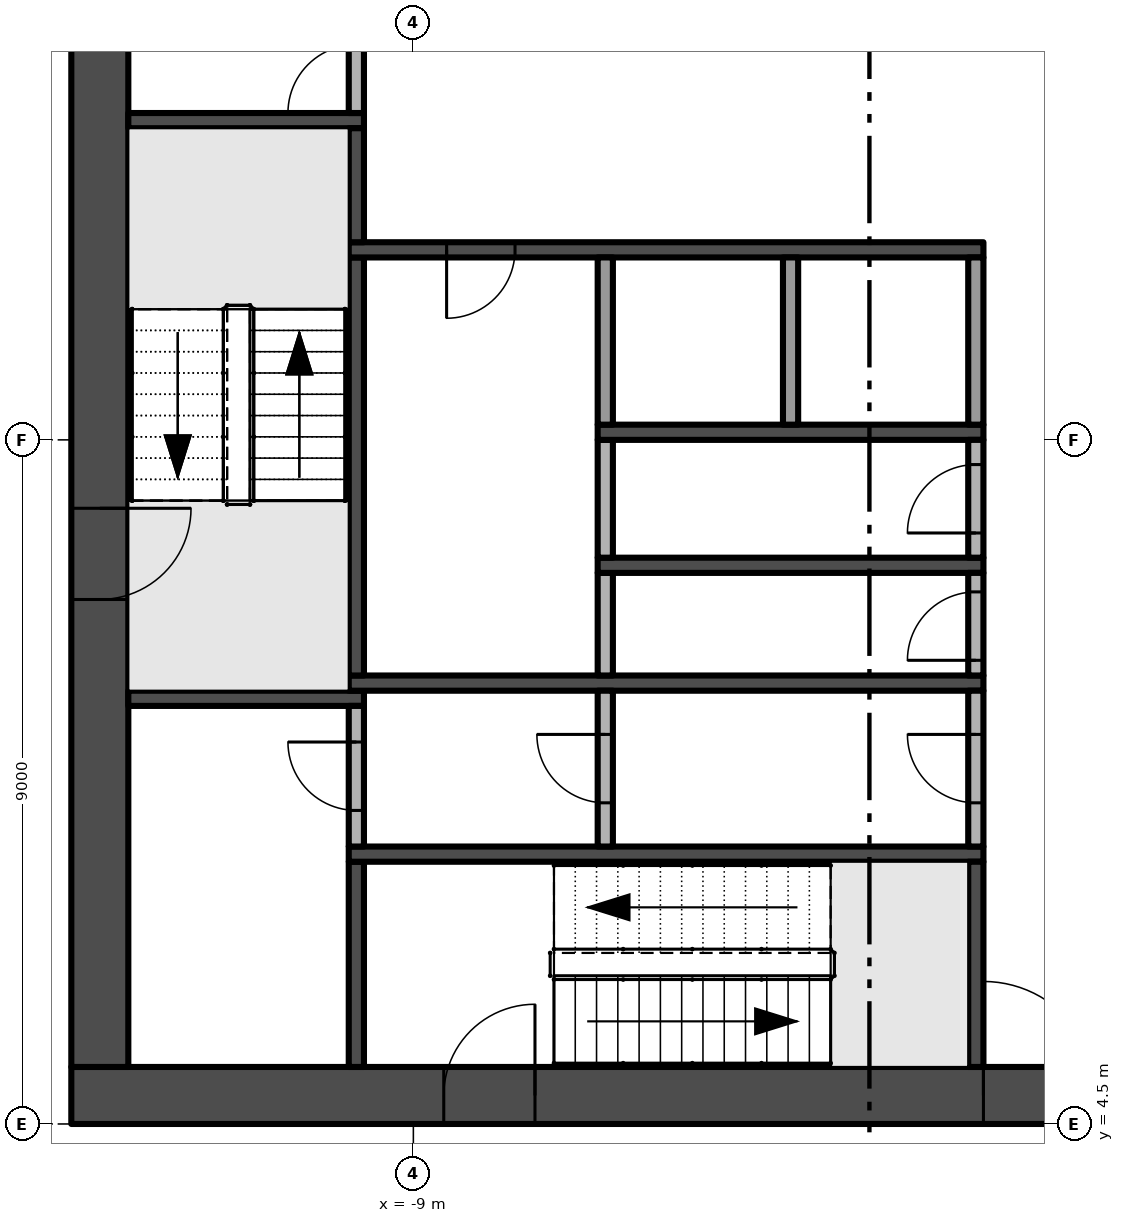
"""IFC4 building model, lengths in metres.
Left out: names, types, materials, properties, quantities, classifications, styles, units other than length and angle.
Written with IfcOpenShell. Run it as: python <this file> out.ifc"""

import sys

from ifc_helpers import new_model, si_unit, direction, frame, frame_2d, origin, place, context, subcontext, project, spatial, rectangle, extrude, element, fill, save


model = new_model("IFC4")
c1 = context("Model", 3, precision=1e-05, world=origin(), true_north=direction((0.0, 1.0)))
c2 = subcontext(c1, "Body", "Model", "MODEL_VIEW")
j1 = project(units=[si_unit("LENGTHUNIT", "METRE"), si_unit("PLANEANGLEUNIT", "RADIAN")], contexts=[c1])
p1 = place(None, origin())
s1 = spatial("IfcSite", under=j1, at=p1, CompositionType="ELEMENT")
p2 = place(p1, origin())
s2 = spatial("IfcBuilding", under=s1, at=p2, CompositionType="ELEMENT")
p3 = place(p2, frame((0.0, 0.0, 174.4)))
s3 = spatial("IfcBuildingStorey", under=s2, at=p3, CompositionType="ELEMENT", Elevation=174.4)
p4 = place(p3, frame((-13.5, 4.875, -0.3), z_axis=(0.0, 0.0, 1.0), x_axis=(1.0, 0.0, 0.0)))
e1 = element("IfcWall", 1, at=p4, inside=s3, PredefinedType="SHEAR", context=c2, shape_type="SweptSolid", body=[
    extrude(rectangle(XDim=27.0, YDim=0.75, at=frame_2d((13.5, 0.0))), origin(), (0.0, 0.0, 1.0), 5.0),
])
p5 = place(p4, frame((12.0, 0.0, 0.3)))
e2 = element("IfcOpeningElement", 2, at=p5, cuts=e1, PredefinedType="OPENING", context=c2, shape_type="SweptSolid", body=[
    extrude(rectangle(XDim=3.0, YDim=2.4, at=frame_2d((1.5, 1.2))), frame((0.0, 0.385, 0.0), z_axis=(0.0, -1.0, 0.0), x_axis=(1.0, 0.0, 0.0)), (0.0, 0.0, 1.0), 0.77),
])
p6 = place(p4, frame((4.9, 0.0, 0.3)))
e3 = element("IfcOpeningElement", 3, at=p6, cuts=e1, PredefinedType="OPENING", context=c2, shape_type="SweptSolid", body=[
    extrude(rectangle(XDim=1.2, YDim=2.2, at=frame_2d((0.6, 1.1))), frame((0.0, 0.385, 0.0), z_axis=(0.0, -1.0, 0.0), x_axis=(1.0, 0.0, 0.0)), (0.0, 0.0, 1.0), 0.77),
])
p7 = place(p4, frame((20.75, 0.0, 0.3)))
e4 = element("IfcOpeningElement", 4, at=p7, cuts=e1, PredefinedType="OPENING", context=c2, shape_type="SweptSolid", body=[
    extrude(rectangle(XDim=1.5, YDim=2.2, at=frame_2d((0.75, 1.1))), frame((0.0, 0.385, 0.0), z_axis=(0.0, -1.0, 0.0), x_axis=(1.0, 0.0, 0.0)), (0.0, 0.0, 1.0), 0.77),
])
p8 = place(p4, frame((17.4, 0.0, 0.3)))
e5 = element("IfcOpeningElement", 5, at=p8, cuts=e1, PredefinedType="OPENING", context=c2, shape_type="SweptSolid", body=[
    extrude(rectangle(XDim=1.2, YDim=2.2, at=frame_2d((0.6, 1.1))), frame((0.0, 0.385, 0.0), z_axis=(0.0, -1.0, 0.0), x_axis=(1.0, 0.0, 0.0)), (0.0, 0.0, 1.0), 0.77),
])
p9 = place(p3, frame((-13.125, 21.75, -0.3), z_axis=(0.0, 0.0, 1.0), x_axis=(0.0, -1.0, 0.0)))
e6 = element("IfcWall", 6, at=p9, inside=s3, PredefinedType="SHEAR", context=c2, shape_type="SweptSolid", body=[
    extrude(rectangle(XDim=16.5, YDim=0.75, at=frame_2d((8.25, 0.0))), origin(), (0.0, 0.0, 1.0), 5.0),
])
p10 = place(p9, frame((9.15, 0.0, 0.3)))
e7 = element("IfcOpeningElement", 7, at=p10, cuts=e6, PredefinedType="OPENING", context=c2, shape_type="SweptSolid", body=[
    extrude(rectangle(XDim=1.2, YDim=2.2, at=frame_2d((0.6, 1.1))), frame((0.0, 0.385, 0.0), z_axis=(0.0, -1.0, 0.0), x_axis=(1.0, 0.0, 0.0)), (0.0, 0.0, 1.0), 0.77),
])
for number, where, z_axis, x_axis in (
    (8, (-12.75, 10.1, 0.0), (0.0, 0.0, 1.0), (1.0, 0.0, 0.0)),
    (9, (-12.75, 17.7, 0.0), (0.0, 0.0, 1.0), (1.0, 0.0, 0.0)),
):
    element("IfcWall", number, at=place(p3, frame(where, z_axis=z_axis, x_axis=x_axis)), inside=s3, PredefinedType="SHEAR", context=c2, shape_type="SweptSolid", body=[
        extrude(rectangle(XDim=3.1, YDim=0.2, at=frame_2d((1.55, 0.0))), origin(), (0.0, 0.0, 1.0), 4.7),
    ])
p11 = place(p3, frame((-9.75, 5.25, 0.0), z_axis=(0.0, 0.0, 1.0), x_axis=(0.0, 1.0, 0.0)))
e10 = element("IfcWall", 10, at=p11, inside=s3, PredefinedType="SHEAR", context=c2, shape_type="SweptSolid", body=[
    extrude(rectangle(XDim=2.7, YDim=0.2, at=frame_2d((1.35, 0.0))), origin(), (0.0, 0.0, 1.0), 4.7),
])
p12 = place(p3, frame((-9.85, 8.05, 0.0), z_axis=(0.0, 0.0, 1.0), x_axis=(1.0, 0.0, 0.0)))
e11 = element("IfcWall", 11, at=p12, inside=s3, PredefinedType="SHEAR", context=c2, shape_type="SweptSolid", body=[
    extrude(rectangle(XDim=8.35, YDim=0.2, at=frame_2d((4.175, 0.0))), origin(), (0.0, 0.0, 1.0), 4.7),
])
p13 = place(p3, frame((-9.75, 8.15, 0.0), z_axis=(0.0, 0.0, 1.0), x_axis=(0.0, 1.0, 0.0)))
e12 = element("IfcWall", 12, at=p13, inside=s3, PredefinedType="PARTITIONING", context=c2, shape_type="SweptSolid", body=[
    extrude(rectangle(XDim=1.85, YDim=0.2, at=frame_2d((0.925, 0.0))), origin(), (0.0, 0.0, 1.0), 4.7),
])
p14 = place(p13, frame((0.475, 0.0, 0.0)))
e13 = element("IfcOpeningElement", 13, at=p14, cuts=e12, PredefinedType="OPENING", context=c2, shape_type="SweptSolid", body=[
    extrude(rectangle(XDim=0.9, YDim=2.1, at=frame_2d((0.45, 1.05))), frame((0.0, 0.11, 0.0), z_axis=(0.0, -1.0, 0.0), x_axis=(1.0, 0.0, 0.0)), (0.0, 0.0, 1.0), 0.22),
])
p15 = place(p3, frame((-9.85, 10.3, 0.0), z_axis=(0.0, 0.0, 1.0), x_axis=(1.0, 0.0, 0.0)))
e14 = element("IfcWall", 14, at=p15, inside=s3, PredefinedType="SHEAR", context=c2, shape_type="SweptSolid", body=[
    extrude(rectangle(XDim=8.35, YDim=0.2, at=frame_2d((4.175, 0.0))), origin(), (0.0, 0.0, 1.0), 4.7),
])
p16 = place(p3, frame((-9.75, 10.4, 0.0), z_axis=(0.0, 0.0, 1.0), x_axis=(0.0, 1.0, 0.0)))
e15 = element("IfcWall", 15, at=p16, inside=s3, PredefinedType="SHEAR", context=c2, shape_type="SweptSolid", body=[
    extrude(rectangle(XDim=5.5, YDim=0.2, at=frame_2d((2.75, 0.0))), origin(), (0.0, 0.0, 1.0), 4.7),
])
p17 = place(p3, frame((-1.5, 16.0, 0.0), z_axis=(0.0, 0.0, 1.0), x_axis=(-1.0, 0.0, 0.0)))
e16 = element("IfcWall", 16, at=p17, inside=s3, PredefinedType="SHEAR", context=c2, shape_type="SweptSolid", body=[
    extrude(rectangle(XDim=8.35, YDim=0.2, at=frame_2d((4.175, 0.0))), origin(), (0.0, 0.0, 1.0), 4.7),
])
p18 = place(p17, frame((6.162, 0.0, 0.0)))
e17 = element("IfcOpeningElement", 17, at=p18, cuts=e16, PredefinedType="OPENING", context=c2, shape_type="SweptSolid", body=[
    extrude(rectangle(XDim=0.9, YDim=2.1, at=frame_2d((0.45, 1.05))), frame((0.0, 0.11, 0.0), z_axis=(0.0, -1.0, 0.0), x_axis=(1.0, 0.0, 0.0)), (0.0, 0.0, 1.0), 0.22),
])
p19 = place(p3, frame((-9.75, 16.1, 0.0), z_axis=(0.0, 0.0, 1.0), x_axis=(0.0, 1.0, 0.0)))
e18 = element("IfcWall", 18, at=p19, inside=s3, PredefinedType="SHEAR", context=c2, shape_type="SweptSolid", body=[
    extrude(rectangle(XDim=1.5, YDim=0.2, at=frame_2d((0.75, 0.0))), origin(), (0.0, 0.0, 1.0), 4.7),
])
p20 = place(p3, frame((-9.75, 17.8, 0.0), z_axis=(0.0, 0.0, 1.0), x_axis=(0.0, 1.0, 0.0)))
e19 = element("IfcWall", 19, at=p20, inside=s3, PredefinedType="PARTITIONING", context=c2, shape_type="SweptSolid", body=[
    extrude(rectangle(XDim=1.4, YDim=0.2, at=frame_2d((0.7, 0.0))), origin(), (0.0, 0.0, 1.0), 4.7),
])
p21 = place(p20, origin())
e20 = element("IfcOpeningElement", 20, at=p21, cuts=e19, PredefinedType="OPENING", context=c2, shape_type="SweptSolid", body=[
    extrude(rectangle(XDim=0.9, YDim=2.1, at=frame_2d((0.45, 1.05))), frame((0.0, 0.11, 0.0), z_axis=(0.0, -1.0, 0.0), x_axis=(1.0, 0.0, 0.0)), (0.0, 0.0, 1.0), 0.22),
])
p22 = place(p3, frame((-6.475, 8.15, 0.0), z_axis=(0.0, 0.0, 1.0), x_axis=(0.0, 1.0, 0.0)))
e21 = element("IfcWall", 21, at=p22, inside=s3, PredefinedType="PARTITIONING", context=c2, shape_type="SweptSolid", body=[
    extrude(rectangle(XDim=2.05, YDim=0.2, at=frame_2d((1.025, 0.0))), origin(), (0.0, 0.0, 1.0), 4.7),
])
p23 = place(p22, frame((0.575, 0.0, 0.0)))
e22 = element("IfcOpeningElement", 22, at=p23, cuts=e21, PredefinedType="OPENING", context=c2, shape_type="SweptSolid", body=[
    extrude(rectangle(XDim=0.9, YDim=2.1, at=frame_2d((0.45, 1.05))), frame((0.0, 0.11, 0.0), z_axis=(0.0, -1.0, 0.0), x_axis=(1.0, 0.0, 0.0)), (0.0, 0.0, 1.0), 0.22),
])
p24 = place(p3, frame((-6.475, 10.4, 0.0), z_axis=(0.0, 0.0, 1.0), x_axis=(0.0, 1.0, 0.0)))
e23 = element("IfcWall", 23, at=p24, inside=s3, PredefinedType="PARTITIONING", context=c2, shape_type="SweptSolid", body=[
    extrude(rectangle(XDim=1.35, YDim=0.2, at=frame_2d((0.675, 0.0))), origin(), (0.0, 0.0, 1.0), 4.7),
])
p25 = place(p3, frame((-6.575, 11.85, 0.0), z_axis=(0.0, 0.0, 1.0), x_axis=(1.0, 0.0, 0.0)))
e24 = element("IfcWall", 24, at=p25, inside=s3, PredefinedType="SHEAR", context=c2, shape_type="SweptSolid", body=[
    extrude(rectangle(XDim=5.075, YDim=0.2, at=frame_2d((2.538, 0.0))), origin(), (0.0, 0.0, 1.0), 4.7),
])
p26 = place(p3, frame((-6.475, 11.95, 0.0), z_axis=(0.0, 0.0, 1.0), x_axis=(0.0, 1.0, 0.0)))
e25 = element("IfcWall", 25, at=p26, inside=s3, PredefinedType="PARTITIONING", context=c2, shape_type="SweptSolid", body=[
    extrude(rectangle(XDim=1.55, YDim=0.2, at=frame_2d((0.775, 0.0))), origin(), (0.0, 0.0, 1.0), 4.7),
])
p27 = place(p3, frame((-6.575, 13.6, 0.0), z_axis=(0.0, 0.0, 1.0), x_axis=(1.0, 0.0, 0.0)))
e26 = element("IfcWall", 26, at=p27, inside=s3, PredefinedType="SHEAR", context=c2, shape_type="SweptSolid", body=[
    extrude(rectangle(XDim=5.075, YDim=0.2, at=frame_2d((2.538, 0.0))), origin(), (0.0, 0.0, 1.0), 4.7),
])
for number, where, z_axis, x_axis in (
    (27, (-6.475, 13.7, 0.0), (0.0, 0.0, 1.0), (0.0, 1.0, 0.0)),
    (28, (-4.037, 13.7, 0.0), (0.0, 0.0, 1.0), (0.0, 1.0, 0.0)),
):
    element("IfcWall", number, at=place(p3, frame(where, z_axis=z_axis, x_axis=x_axis)), inside=s3, PredefinedType="PARTITIONING", context=c2, shape_type="SweptSolid", body=[
        extrude(rectangle(XDim=2.2, YDim=0.2, at=frame_2d((1.1, 0.0))), origin(), (0.0, 0.0, 1.0), 4.7),
    ])
p28 = place(p3, frame((-1.6, 5.25, 0.0), z_axis=(0.0, 0.0, 1.0), x_axis=(0.0, 1.0, 0.0)))
e29 = element("IfcWall", 29, at=p28, inside=s3, PredefinedType="SHEAR", context=c2, shape_type="SweptSolid", body=[
    extrude(rectangle(XDim=2.7, YDim=0.2, at=frame_2d((1.35, 0.0))), origin(), (0.0, 0.0, 1.0), 4.7),
])
p29 = place(p3, frame((-1.6, 8.15, 0.0), z_axis=(0.0, 0.0, 1.0), x_axis=(0.0, 1.0, 0.0)))
e30 = element("IfcWall", 30, at=p29, inside=s3, PredefinedType="PARTITIONING", context=c2, shape_type="SweptSolid", body=[
    extrude(rectangle(XDim=2.05, YDim=0.2, at=frame_2d((1.025, 0.0))), origin(), (0.0, 0.0, 1.0), 4.7),
])
p30 = place(p29, frame((0.575, 0.0, 0.0)))
e31 = element("IfcOpeningElement", 31, at=p30, cuts=e30, PredefinedType="OPENING", context=c2, shape_type="SweptSolid", body=[
    extrude(rectangle(XDim=0.9, YDim=2.1, at=frame_2d((0.45, 1.05))), frame((0.0, 0.11, 0.0), z_axis=(0.0, -1.0, 0.0), x_axis=(1.0, 0.0, 0.0)), (0.0, 0.0, 1.0), 0.22),
])
p31 = place(p3, frame((-1.6, 10.4, 0.0), z_axis=(0.0, 0.0, 1.0), x_axis=(0.0, 1.0, 0.0)))
e32 = element("IfcWall", 32, at=p31, inside=s3, PredefinedType="PARTITIONING", context=c2, shape_type="SweptSolid", body=[
    extrude(rectangle(XDim=1.35, YDim=0.2, at=frame_2d((0.675, 0.0))), origin(), (0.0, 0.0, 1.0), 4.7),
])
p32 = place(p31, frame((0.2, 0.0, 0.0)))
e33 = element("IfcOpeningElement", 33, at=p32, cuts=e32, PredefinedType="OPENING", context=c2, shape_type="SweptSolid", body=[
    extrude(rectangle(XDim=0.9, YDim=2.1, at=frame_2d((0.45, 1.05))), frame((0.0, 0.11, 0.0), z_axis=(0.0, -1.0, 0.0), x_axis=(1.0, 0.0, 0.0)), (0.0, 0.0, 1.0), 0.22),
])
p33 = place(p3, frame((-1.6, 11.95, 0.0), z_axis=(0.0, 0.0, 1.0), x_axis=(0.0, 1.0, 0.0)))
e34 = element("IfcWall", 34, at=p33, inside=s3, PredefinedType="PARTITIONING", context=c2, shape_type="SweptSolid", body=[
    extrude(rectangle(XDim=1.55, YDim=0.2, at=frame_2d((0.775, 0.0))), origin(), (0.0, 0.0, 1.0), 4.7),
])
p34 = place(p33, frame((0.325, 0.0, 0.0)))
e35 = element("IfcOpeningElement", 35, at=p34, cuts=e34, PredefinedType="OPENING", context=c2, shape_type="SweptSolid", body=[
    extrude(rectangle(XDim=0.9, YDim=2.1, at=frame_2d((0.45, 1.05))), frame((0.0, 0.11, 0.0), z_axis=(0.0, -1.0, 0.0), x_axis=(1.0, 0.0, 0.0)), (0.0, 0.0, 1.0), 0.22),
])
p35 = place(p3, frame((-1.6, 13.7, 0.0), z_axis=(0.0, 0.0, 1.0), x_axis=(0.0, 1.0, 0.0)))
e36 = element("IfcWall", 36, at=p35, inside=s3, PredefinedType="PARTITIONING", context=c2, shape_type="SweptSolid", body=[
    extrude(rectangle(XDim=2.2, YDim=0.2, at=frame_2d((1.1, 0.0))), origin(), (0.0, 0.0, 1.0), 4.7),
])
p36 = place(p5, frame((3.0, 0.0, 0.0), z_axis=(0.0, 0.0, 1.0), x_axis=(-1.0, 0.0, 0.0)))
e37 = element("IfcDoor", 37, at=p36, inside=s3, OperationType="DOUBLE_DOOR_SINGLE_SWING", PredefinedType="DOOR", context=c2, shape_type="SweptSolid", body=[
    extrude(rectangle(XDim=3.0, YDim=2.4, at=frame_2d((1.5, 1.2))), frame((0.0, 0.025, 0.0), z_axis=(0.0, -1.0, 0.0), x_axis=(1.0, 0.0, 0.0)), (0.0, 0.0, 1.0), 0.05),
])
fill(e2, e37)
p37 = place(p10, frame((1.2, 0.0, 0.0), z_axis=(0.0, 0.0, 1.0), x_axis=(-1.0, 0.0, 0.0)))
e38 = element("IfcDoor", 38, at=p37, inside=s3, OperationType="SINGLE_SWING_RIGHT", PredefinedType="DOOR", context=c2, shape_type="SweptSolid", body=[
    extrude(rectangle(XDim=1.2, YDim=2.2, at=frame_2d((0.6, 1.1))), frame((0.0, 0.025, 0.0), z_axis=(0.0, -1.0, 0.0), x_axis=(1.0, 0.0, 0.0)), (0.0, 0.0, 1.0), 0.05),
])
fill(e7, e38)
p38 = place(p6, frame((1.2, 0.0, 0.0), z_axis=(0.0, 0.0, 1.0), x_axis=(-1.0, 0.0, 0.0)))
e39 = element("IfcDoor", 39, at=p38, inside=s3, OperationType="SINGLE_SWING_LEFT", PredefinedType="DOOR", context=c2, shape_type="SweptSolid", body=[
    extrude(rectangle(XDim=1.2, YDim=2.2, at=frame_2d((0.6, 1.1))), frame((0.0, 0.025, 0.0), z_axis=(0.0, -1.0, 0.0), x_axis=(1.0, 0.0, 0.0)), (0.0, 0.0, 1.0), 0.05),
])
fill(e3, e39)
p39 = place(p18, origin())
e40 = element("IfcDoor", 40, at=p39, inside=s3, OperationType="SINGLE_SWING_RIGHT", PredefinedType="DOOR", context=c2, shape_type="SweptSolid", body=[
    extrude(rectangle(XDim=0.9, YDim=2.1, at=frame_2d((0.45, 1.05))), frame((0.0, 0.025, 0.0), z_axis=(0.0, -1.0, 0.0), x_axis=(1.0, 0.0, 0.0)), (0.0, 0.0, 1.0), 0.05),
])
fill(e17, e40)
p40 = place(p30, origin())
e41 = element("IfcDoor", 41, at=p40, inside=s3, OperationType="SINGLE_SWING_RIGHT", PredefinedType="DOOR", context=c2, shape_type="SweptSolid", body=[
    extrude(rectangle(XDim=0.9, YDim=2.1, at=frame_2d((0.45, 1.05))), frame((0.0, 0.025, 0.0), z_axis=(0.0, -1.0, 0.0), x_axis=(1.0, 0.0, 0.0)), (0.0, 0.0, 1.0), 0.05),
])
fill(e31, e41)
p41 = place(p32, origin())
e42 = element("IfcDoor", 42, at=p41, inside=s3, OperationType="SINGLE_SWING_LEFT", PredefinedType="DOOR", context=c2, shape_type="SweptSolid", body=[
    extrude(rectangle(XDim=0.9, YDim=2.1, at=frame_2d((0.45, 1.05))), frame((0.0, 0.025, 0.0), z_axis=(0.0, -1.0, 0.0), x_axis=(1.0, 0.0, 0.0)), (0.0, 0.0, 1.0), 0.05),
])
fill(e33, e42)
p42 = place(p34, origin())
e43 = element("IfcDoor", 43, at=p42, inside=s3, OperationType="SINGLE_SWING_LEFT", PredefinedType="DOOR", context=c2, shape_type="SweptSolid", body=[
    extrude(rectangle(XDim=0.9, YDim=2.1, at=frame_2d((0.45, 1.05))), frame((0.0, 0.025, 0.0), z_axis=(0.0, -1.0, 0.0), x_axis=(1.0, 0.0, 0.0)), (0.0, 0.0, 1.0), 0.05),
])
fill(e35, e43)
p43 = place(p21, origin())
e44 = element("IfcDoor", 44, at=p43, inside=s3, OperationType="SINGLE_SWING_LEFT", PredefinedType="DOOR", context=c2, shape_type="SweptSolid", body=[
    extrude(rectangle(XDim=0.9, YDim=2.1, at=frame_2d((0.45, 1.05))), frame((0.0, 0.025, 0.0), z_axis=(0.0, -1.0, 0.0), x_axis=(1.0, 0.0, 0.0)), (0.0, 0.0, 1.0), 0.05),
])
fill(e20, e44)
p44 = place(p23, origin())
e45 = element("IfcDoor", 45, at=p44, inside=s3, OperationType="SINGLE_SWING_RIGHT", PredefinedType="DOOR", context=c2, shape_type="SweptSolid", body=[
    extrude(rectangle(XDim=0.9, YDim=2.1, at=frame_2d((0.45, 1.05))), frame((0.0, 0.025, 0.0), z_axis=(0.0, -1.0, 0.0), x_axis=(1.0, 0.0, 0.0)), (0.0, 0.0, 1.0), 0.05),
])
fill(e22, e45)
p45 = place(p14, origin())
e46 = element("IfcDoor", 46, at=p45, inside=s3, OperationType="SINGLE_SWING_RIGHT", PredefinedType="DOOR", context=c2, shape_type="SweptSolid", body=[
    extrude(rectangle(XDim=0.9, YDim=2.1, at=frame_2d((0.45, 1.05))), frame((0.0, 0.025, 0.0), z_axis=(0.0, -1.0, 0.0), x_axis=(1.0, 0.0, 0.0)), (0.0, 0.0, 1.0), 0.05),
])
fill(e13, e46)
save(model, sys.argv[1])
